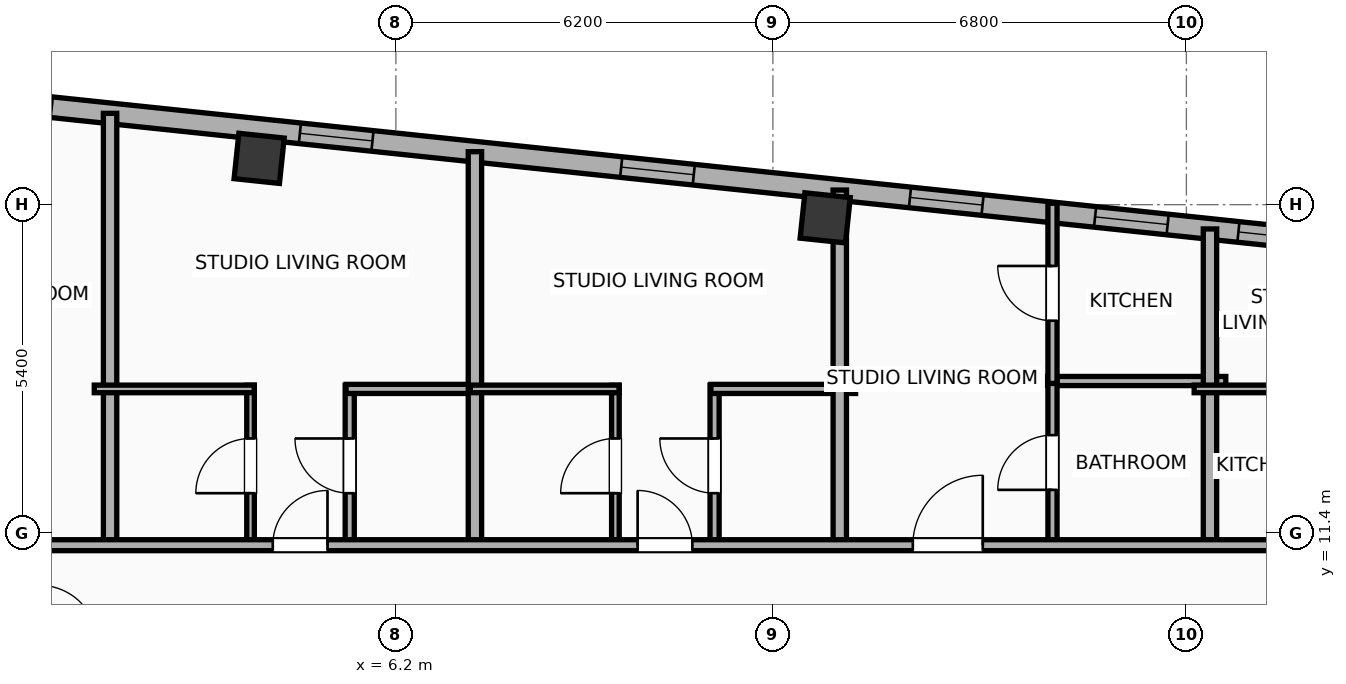
"""IFC4 building model, lengths in metres.
Left out: names, types, materials, properties, quantities, classifications, styles, units other than length and angle.
Written with IfcOpenShell. Run it as: python <this file> out.ifc"""

import sys

from ifc_helpers import new_model, si_unit, direction, frame, frame_2d, origin, origin_2d, place, context, subcontext, project, spatial, rectangle, hollow_rectangle, extrude, element, fill, save


model = new_model("IFC4")
c1 = context("Model", 3, precision=1e-05, world=origin(), true_north=direction((0.0, 1.0)))
c2 = subcontext(c1, "Body", "Model", "MODEL_VIEW")
j1 = project(units=[si_unit("LENGTHUNIT", "METRE"), si_unit("PLANEANGLEUNIT", "RADIAN")], contexts=[c1])
p1 = place(None, origin())
s1 = spatial("IfcSite", under=j1, at=p1, CompositionType="ELEMENT")
p2 = place(p1, origin())
s2 = spatial("IfcBuilding", under=s1, at=p2, CompositionType="ELEMENT")
p3 = place(p2, frame((0.0, 0.0, 287.3)))
s3 = spatial("IfcBuildingStorey", under=s2, at=p3, CompositionType="ELEMENT", Elevation=287.3)
for number, where, z_axis, x_axis in (
    (1, (13.26, 16.583, 0.0), (0.0, 0.0, 1.0), (0.995, -0.105, 0.0)),
    (2, (3.952, 17.561, 0.0), (0.0, 0.0, 1.0), (0.995, -0.105, 0.0)),
):
    element("IfcColumn", number, at=place(p3, frame(where, z_axis=z_axis, x_axis=x_axis)), inside=s3, PredefinedType="COLUMN", context=c2, shape_type="SweptSolid", body=[
        extrude(hollow_rectangle(XDim=0.75, YDim=0.75, WallThickness=0.025, at=origin_2d()), origin(), (0.0, 0.0, 1.0), 3.9),
    ])
p4 = place(p3, frame((-23.908, 20.972, 0.0), z_axis=(0.0, 0.0, 1.0), x_axis=(0.994521888554, -0.104528528102, 0.0)))
e3 = element("IfcWall", 3, at=p4, inside=s3, PredefinedType="ELEMENTEDWALL", context=c2, shape_type="SweptSolid", body=[
    extrude(rectangle(XDim=46.766, YDim=0.34, at=frame_2d((23.383, 0.0))), origin(), (0.0, 0.0, 1.0), 3.635),
])
p5 = place(p4, frame((22.183, 0.0, 0.75)))
e4 = element("IfcOpeningElement", 4, at=p5, cuts=e3, PredefinedType="OPENING", context=c2, shape_type="SweptSolid", body=[
    extrude(rectangle(XDim=2.4, YDim=2.1, at=frame_2d((1.2, 1.05))), frame((0.0, 0.18, 0.0), z_axis=(0.0, -1.0, 0.0), x_axis=(1.0, 0.0, 0.0)), (0.0, 0.0, 1.0), 0.36),
])
p6 = place(p4, frame((4.49, 0.0, 0.75)))
e5 = element("IfcOpeningElement", 5, at=p6, cuts=e3, PredefinedType="OPENING", context=c2, shape_type="SweptSolid", body=[
    extrude(rectangle(XDim=1.2, YDim=2.05, at=frame_2d((0.6, 1.025))), frame((0.0, 0.18, 0.0), z_axis=(0.0, -1.0, 0.0), x_axis=(1.0, 0.0, 0.0)), (0.0, 0.0, 1.0), 0.36),
])
p7 = place(p4, frame((1.657, 0.0, 0.75)))
e6 = element("IfcOpeningElement", 6, at=p7, cuts=e3, PredefinedType="OPENING", context=c2, shape_type="SweptSolid", body=[
    extrude(rectangle(XDim=1.2, YDim=2.05, at=frame_2d((0.6, 1.025))), frame((0.0, 0.18, 0.0), z_axis=(0.0, -1.0, 0.0), x_axis=(1.0, 0.0, 0.0)), (0.0, 0.0, 1.0), 0.36),
])
p8 = place(p4, frame((9.885, 0.0, 0.75)))
e7 = element("IfcOpeningElement", 7, at=p8, cuts=e3, PredefinedType="OPENING", context=c2, shape_type="SweptSolid", body=[
    extrude(rectangle(XDim=1.2, YDim=2.05, at=frame_2d((0.6, 1.025))), frame((0.0, 0.18, 0.0), z_axis=(0.0, -1.0, 0.0), x_axis=(1.0, 0.0, 0.0)), (0.0, 0.0, 1.0), 0.36),
])
p9 = place(p4, frame((16.427, 0.0, 0.75)))
e8 = element("IfcOpeningElement", 8, at=p9, cuts=e3, PredefinedType="OPENING", context=c2, shape_type="SweptSolid", body=[
    extrude(rectangle(XDim=1.2, YDim=2.05, at=frame_2d((0.6, 1.025))), frame((0.0, 0.18, 0.0), z_axis=(0.0, -1.0, 0.0), x_axis=(1.0, 0.0, 0.0)), (0.0, 0.0, 1.0), 0.36),
])
p10 = place(p4, frame((13.159, 0.0, 0.75)))
e9 = element("IfcOpeningElement", 9, at=p10, cuts=e3, PredefinedType="OPENING", context=c2, shape_type="SweptSolid", body=[
    extrude(rectangle(XDim=1.2, YDim=2.05, at=frame_2d((0.6, 1.025))), frame((0.0, 0.18, 0.0), z_axis=(0.0, -1.0, 0.0), x_axis=(1.0, 0.0, 0.0)), (0.0, 0.0, 1.0), 0.36),
])
p11 = place(p4, frame((19.586, 0.0, 0.75)))
e10 = element("IfcOpeningElement", 10, at=p11, cuts=e3, PredefinedType="OPENING", context=c2, shape_type="SweptSolid", body=[
    extrude(rectangle(XDim=1.2, YDim=2.05, at=frame_2d((0.6, 1.025))), frame((0.0, 0.18, 0.0), z_axis=(0.0, -1.0, 0.0), x_axis=(1.0, 0.0, 0.0)), (0.0, 0.0, 1.0), 0.36),
])
p12 = place(p4, frame((28.687, 0.0, 0.75)))
e11 = element("IfcOpeningElement", 11, at=p12, cuts=e3, PredefinedType="OPENING", context=c2, shape_type="SweptSolid", body=[
    extrude(rectangle(XDim=1.2, YDim=2.05, at=frame_2d((0.6, 1.025))), frame((0.0, 0.18, 0.0), z_axis=(0.0, -1.0, 0.0), x_axis=(1.0, 0.0, 0.0)), (0.0, 0.0, 1.0), 0.36),
])
p13 = place(p4, frame((34.0, 0.0, 0.75)))
e12 = element("IfcOpeningElement", 12, at=p13, cuts=e3, PredefinedType="OPENING", context=c2, shape_type="SweptSolid", body=[
    extrude(rectangle(XDim=1.2, YDim=2.05, at=frame_2d((0.6, 1.025))), frame((0.0, 0.18, 0.0), z_axis=(0.0, -1.0, 0.0), x_axis=(1.0, 0.0, 0.0)), (0.0, 0.0, 1.0), 0.36),
])
p14 = place(p4, frame((38.775, 0.0, 0.75)))
e13 = element("IfcOpeningElement", 13, at=p14, cuts=e3, PredefinedType="OPENING", context=c2, shape_type="SweptSolid", body=[
    extrude(rectangle(XDim=1.2, YDim=2.05, at=frame_2d((0.6, 1.025))), frame((0.0, 0.18, 0.0), z_axis=(0.0, -1.0, 0.0), x_axis=(1.0, 0.0, 0.0)), (0.0, 0.0, 1.0), 0.36),
])
p15 = place(p4, frame((41.836, 0.0, 0.75)))
e14 = element("IfcOpeningElement", 14, at=p15, cuts=e3, PredefinedType="OPENING", context=c2, shape_type="SweptSolid", body=[
    extrude(rectangle(XDim=1.2, YDim=2.05, at=frame_2d((0.6, 1.025))), frame((0.0, 0.18, 0.0), z_axis=(0.0, -1.0, 0.0), x_axis=(1.0, 0.0, 0.0)), (0.0, 0.0, 1.0), 0.36),
])
p16 = place(p4, frame((44.206, 0.0, 0.75)))
e15 = element("IfcOpeningElement", 15, at=p16, cuts=e3, PredefinedType="OPENING", context=c2, shape_type="SweptSolid", body=[
    extrude(rectangle(XDim=1.2, YDim=2.05, at=frame_2d((0.6, 1.025))), frame((0.0, 0.18, 0.0), z_axis=(0.0, -1.0, 0.0), x_axis=(1.0, 0.0, 0.0)), (0.0, 0.0, 1.0), 0.36),
])
p17 = place(p3, frame((1.5, 11.12, 0.0), z_axis=(0.0, 0.0, 1.0), x_axis=(0.0, 1.0, 0.0)))
e16 = element("IfcWall", 16, at=p17, inside=s3, PredefinedType="PARTITIONING", context=c2, shape_type="SweptSolid", body=[
    extrude(rectangle(XDim=7.182, YDim=0.22, at=frame_2d((3.591, 0.0))), origin(), (0.0, 0.0, 1.0), 3.635),
])
p18 = place(p3, frame((3.81, 11.18, 0.0), z_axis=(0.0, 0.0, 1.0), x_axis=(0.0, 1.0, 0.0)))
e17 = element("IfcWall", 17, at=p18, inside=s3, PredefinedType="PARTITIONING", context=c2, shape_type="SweptSolid", body=[
    extrude(rectangle(XDim=2.65, YDim=0.125, at=frame_2d((1.325, 0.0))), origin(), (0.0, 0.0, 1.0), 3.635),
])
p19 = place(p18, frame((0.875, 0.0, 0.0)))
e18 = element("IfcOpeningElement", 18, at=p19, cuts=e17, PredefinedType="OPENING", context=c2, shape_type="SweptSolid", body=[
    extrude(rectangle(XDim=0.9, YDim=2.05, at=frame_2d((0.45, 1.025))), frame((0.0, 0.073, 0.0), z_axis=(0.0, -1.0, 0.0), x_axis=(1.0, 0.0, 0.0)), (0.0, 0.0, 1.0), 0.145),
])
p20 = place(p3, frame((5.441, 11.18, 0.0), z_axis=(0.0, 0.0, 1.0), x_axis=(0.0, 1.0, 0.0)))
e19 = element("IfcWall", 19, at=p20, inside=s3, PredefinedType="PLUMBINGWALL", context=c2, shape_type="SweptSolid", body=[
    extrude(rectangle(XDim=2.65, YDim=0.15, at=frame_2d((1.325, 0.0))), origin(), (0.0, 0.0, 1.0), 3.635),
])
p21 = place(p20, frame((0.875, 0.0, 0.0)))
e20 = element("IfcOpeningElement", 20, at=p21, cuts=e19, PredefinedType="OPENING", context=c2, shape_type="SweptSolid", body=[
    extrude(rectangle(XDim=0.9, YDim=2.05, at=frame_2d((0.45, 1.025))), frame((0.0, 0.085, 0.0), z_axis=(0.0, -1.0, 0.0), x_axis=(1.0, 0.0, 0.0)), (0.0, 0.0, 1.0), 0.17),
])
p22 = place(p3, frame((1.24, 13.77, 0.0), z_axis=(0.0, 0.0, 1.0), x_axis=(1.0, 0.0, 0.0)))
e21 = element("IfcWall", 21, at=p22, inside=s3, PredefinedType="PARTITIONING", context=c2, shape_type="SweptSolid", body=[
    extrude(rectangle(XDim=2.63, YDim=0.125, at=frame_2d((1.315, 0.0))), origin(), (0.0, 0.0, 1.0), 3.635),
])
p23 = place(p3, frame((5.381, 13.77, 0.0), z_axis=(0.0, 0.0, 1.0), x_axis=(1.0, 0.0, 0.0)))
e22 = element("IfcWall", 22, at=p23, inside=s3, PredefinedType="PLUMBINGWALL", context=c2, shape_type="SweptSolid", body=[
    extrude(rectangle(XDim=2.194, YDim=0.15, at=frame_2d((1.097, 0.0))), origin(), (0.0, 0.0, 1.0), 3.635),
])
p24 = place(p3, frame((7.5, 11.12, 0.0), z_axis=(0.0, 0.0, 1.0), x_axis=(0.0, 1.0, 0.0)))
e23 = element("IfcWall", 23, at=p24, inside=s3, PredefinedType="PARTITIONING", context=c2, shape_type="SweptSolid", body=[
    extrude(rectangle(XDim=6.551, YDim=0.22, at=frame_2d((3.275, 0.0))), origin(), (0.0, 0.0, 1.0), 3.635),
])
p25 = place(p3, frame((9.81, 11.18, 0.0), z_axis=(0.0, 0.0, 1.0), x_axis=(0.0, 1.0, 0.0)))
e24 = element("IfcWall", 24, at=p25, inside=s3, PredefinedType="PARTITIONING", context=c2, shape_type="SweptSolid", body=[
    extrude(rectangle(XDim=2.65, YDim=0.125, at=frame_2d((1.325, 0.0))), origin(), (0.0, 0.0, 1.0), 3.635),
])
p26 = place(p25, frame((0.875, 0.0, 0.0)))
e25 = element("IfcOpeningElement", 25, at=p26, cuts=e24, PredefinedType="OPENING", context=c2, shape_type="SweptSolid", body=[
    extrude(rectangle(XDim=0.9, YDim=2.05, at=frame_2d((0.45, 1.025))), frame((0.0, 0.073, 0.0), z_axis=(0.0, -1.0, 0.0), x_axis=(1.0, 0.0, 0.0)), (0.0, 0.0, 1.0), 0.145),
])
p27 = place(p3, frame((11.441, 11.18, 0.0), z_axis=(0.0, 0.0, 1.0), x_axis=(0.0, 1.0, 0.0)))
e26 = element("IfcWall", 26, at=p27, inside=s3, PredefinedType="PLUMBINGWALL", context=c2, shape_type="SweptSolid", body=[
    extrude(rectangle(XDim=2.65, YDim=0.15, at=frame_2d((1.325, 0.0))), origin(), (0.0, 0.0, 1.0), 3.635),
])
p28 = place(p27, frame((0.875, 0.0, 0.0)))
e27 = element("IfcOpeningElement", 27, at=p28, cuts=e26, PredefinedType="OPENING", context=c2, shape_type="SweptSolid", body=[
    extrude(rectangle(XDim=0.9, YDim=2.05, at=frame_2d((0.45, 1.025))), frame((0.0, 0.085, 0.0), z_axis=(0.0, -1.0, 0.0), x_axis=(1.0, 0.0, 0.0)), (0.0, 0.0, 1.0), 0.17),
])
p29 = place(p3, frame((7.425, 13.77, 0.0), z_axis=(0.0, 0.0, 1.0), x_axis=(1.0, 0.0, 0.0)))
e28 = element("IfcWall", 28, at=p29, inside=s3, PredefinedType="PARTITIONING", context=c2, shape_type="SweptSolid", body=[
    extrude(rectangle(XDim=2.445, YDim=0.125, at=frame_2d((1.223, 0.0))), origin(), (0.0, 0.0, 1.0), 3.635),
])
p30 = place(p3, frame((11.381, 13.77, 0.0), z_axis=(0.0, 0.0, 1.0), x_axis=(1.0, 0.0, 0.0)))
e29 = element("IfcWall", 29, at=p30, inside=s3, PredefinedType="PLUMBINGWALL", context=c2, shape_type="SweptSolid", body=[
    extrude(rectangle(XDim=2.379, YDim=0.15, at=frame_2d((1.189, 0.0))), origin(), (0.0, 0.0, 1.0), 3.635),
])
p31 = place(p3, frame((13.5, 11.12, 0.0), z_axis=(0.0, 0.0, 1.0), x_axis=(0.0, 1.0, 0.0)))
e30 = element("IfcWall", 30, at=p31, inside=s3, PredefinedType="PARTITIONING", context=c2, shape_type="SweptSolid", body=[
    extrude(rectangle(XDim=5.92, YDim=0.22, at=frame_2d((2.96, 0.0))), origin(), (0.0, 0.0, 1.0), 3.635),
])
p32 = place(p3, frame((16.918, 13.9, 0.0), z_axis=(0.0, 0.0, 1.0), x_axis=(1.0, 0.0, 0.0)))
e31 = element("IfcWall", 31, at=p32, inside=s3, PredefinedType="PLUMBINGWALL", context=c2, shape_type="SweptSolid", body=[
    extrude(rectangle(XDim=2.93, YDim=0.15, at=frame_2d((1.465, 0.0))), origin(), (0.0, 0.0, 1.0), 3.635),
])
p33 = place(p3, frame((16.998, 11.18, 0.0), z_axis=(0.0, 0.0, 1.0), x_axis=(0.0, 1.0, 0.0)))
e32 = element("IfcWall", 32, at=p33, inside=s3, PredefinedType="PLUMBINGWALL", context=c2, shape_type="SweptSolid", body=[
    extrude(rectangle(XDim=2.76, YDim=0.15, at=frame_2d((1.38, 0.0))), origin(), (0.0, 0.0, 1.0), 3.635),
])
p34 = place(p33, frame((0.93, 0.0, 0.0)))
e33 = element("IfcOpeningElement", 33, at=p34, cuts=e32, PredefinedType="OPENING", context=c2, shape_type="SweptSolid", body=[
    extrude(rectangle(XDim=0.9, YDim=2.05, at=frame_2d((0.45, 1.025))), frame((0.0, 0.085, 0.0), z_axis=(0.0, -1.0, 0.0), x_axis=(1.0, 0.0, 0.0)), (0.0, 0.0, 1.0), 0.17),
])
p35 = place(p3, frame((16.998, 13.86, 0.0), z_axis=(0.0, 0.0, 1.0), x_axis=(0.0, 1.0, 0.0)))
e34 = element("IfcWall", 34, at=p35, inside=s3, PredefinedType="PLUMBINGWALL", context=c2, shape_type="SweptSolid", body=[
    extrude(rectangle(XDim=2.963, YDim=0.15, at=frame_2d((1.482, 0.0))), origin(), (0.0, 0.0, 1.0), 3.635),
])
p36 = place(p35, frame((1.032, 0.0, 0.0)))
e35 = element("IfcOpeningElement", 35, at=p36, cuts=e34, PredefinedType="OPENING", context=c2, shape_type="SweptSolid", body=[
    extrude(rectangle(XDim=0.9, YDim=2.05, at=frame_2d((0.45, 1.025))), frame((0.0, 0.085, 0.0), z_axis=(0.0, -1.0, 0.0), x_axis=(1.0, 0.0, 0.0)), (0.0, 0.0, 1.0), 0.17),
])
p37 = place(p3, frame((19.588, 11.12, 0.0), z_axis=(0.0, 0.0, 1.0), x_axis=(0.0, 1.0, 0.0)))
e36 = element("IfcWall", 36, at=p37, inside=s3, PredefinedType="PARTITIONING", context=c2, shape_type="SweptSolid", body=[
    extrude(rectangle(XDim=5.281, YDim=0.22, at=frame_2d((2.64, 0.0))), origin(), (0.0, 0.0, 1.0), 3.635),
])
p38 = place(p3, frame((19.328, 13.77, 0.0), z_axis=(0.0, 0.0, 1.0), x_axis=(1.0, 0.0, 0.0)))
e37 = element("IfcWall", 37, at=p38, inside=s3, PredefinedType="PARTITIONING", context=c2, shape_type="SweptSolid", body=[
    extrude(rectangle(XDim=2.671, YDim=0.125, at=frame_2d((1.335, 0.0))), origin(), (0.0, 0.0, 1.0), 3.635),
])
p39 = place(p3, frame((-28.401, 11.2, 0.0), z_axis=(0.0, 0.0, 1.0), x_axis=(1.0, 0.0, 0.0)))
e38 = element("IfcWall", 38, at=p39, inside=s3, PredefinedType="PARTITIONING", context=c2, shape_type="SweptSolid", body=[
    extrude(rectangle(XDim=53.956, YDim=0.18, at=frame_2d((26.978, 0.0))), origin(), (0.0, 0.0, 1.0), 3.635),
])
p40 = place(p39, frame((2.512, 0.0, 0.0)))
e39 = element("IfcOpeningElement", 39, at=p40, cuts=e38, PredefinedType="OPENING", context=c2, shape_type="SweptSolid", body=[
    extrude(rectangle(XDim=0.9, YDim=2.05, at=frame_2d((0.45, 1.025))), frame((0.0, 0.1, 0.0), z_axis=(0.0, -1.0, 0.0), x_axis=(1.0, 0.0, 0.0)), (0.0, 0.0, 1.0), 0.2),
])
p41 = place(p39, frame((8.948, 0.0, 0.0)))
e40 = element("IfcOpeningElement", 40, at=p41, cuts=e38, PredefinedType="OPENING", context=c2, shape_type="SweptSolid", body=[
    extrude(rectangle(XDim=1.15, YDim=2.05, at=frame_2d((0.575, 1.025))), frame((0.0, 0.1, 0.0), z_axis=(0.0, -1.0, 0.0), x_axis=(1.0, 0.0, 0.0)), (0.0, 0.0, 1.0), 0.2),
])
p42 = place(p39, frame((13.821, 0.0, 0.0)))
e41 = element("IfcOpeningElement", 41, at=p42, cuts=e38, PredefinedType="OPENING", context=c2, shape_type="SweptSolid", body=[
    extrude(rectangle(XDim=0.9, YDim=2.05, at=frame_2d((0.45, 1.025))), frame((0.0, 0.1, 0.0), z_axis=(0.0, -1.0, 0.0), x_axis=(1.0, 0.0, 0.0)), (0.0, 0.0, 1.0), 0.2),
])
p43 = place(p39, frame((20.818, 0.0, 0.0)))
e42 = element("IfcOpeningElement", 42, at=p43, cuts=e38, PredefinedType="OPENING", context=c2, shape_type="SweptSolid", body=[
    extrude(rectangle(XDim=1.15, YDim=2.05, at=frame_2d((0.575, 1.025))), frame((0.0, 0.1, 0.0), z_axis=(0.0, -1.0, 0.0), x_axis=(1.0, 0.0, 0.0)), (0.0, 0.0, 1.0), 0.2),
])
p44 = place(p39, frame((27.212, 0.0, 0.0)))
e43 = element("IfcOpeningElement", 43, at=p44, cuts=e38, PredefinedType="OPENING", context=c2, shape_type="SweptSolid", body=[
    extrude(rectangle(XDim=1.15, YDim=2.05, at=frame_2d((0.575, 1.025))), frame((0.0, 0.1, 0.0), z_axis=(0.0, -1.0, 0.0), x_axis=(1.0, 0.0, 0.0)), (0.0, 0.0, 1.0), 0.2),
])
p45 = place(p39, frame((32.576, 0.0, 0.0)))
e44 = element("IfcOpeningElement", 44, at=p45, cuts=e38, PredefinedType="OPENING", context=c2, shape_type="SweptSolid", body=[
    extrude(rectangle(XDim=0.9, YDim=2.05, at=frame_2d((0.45, 1.025))), frame((0.0, 0.1, 0.0), z_axis=(0.0, -1.0, 0.0), x_axis=(1.0, 0.0, 0.0)), (0.0, 0.0, 1.0), 0.2),
])
p46 = place(p39, frame((38.576, 0.0, 0.0)))
e45 = element("IfcOpeningElement", 45, at=p46, cuts=e38, PredefinedType="OPENING", context=c2, shape_type="SweptSolid", body=[
    extrude(rectangle(XDim=0.9, YDim=2.05, at=frame_2d((0.45, 1.025))), frame((0.0, 0.1, 0.0), z_axis=(0.0, -1.0, 0.0), x_axis=(1.0, 0.0, 0.0)), (0.0, 0.0, 1.0), 0.2),
])
p47 = place(p39, frame((43.102, 0.0, 0.0)))
e46 = element("IfcOpeningElement", 46, at=p47, cuts=e38, PredefinedType="OPENING", context=c2, shape_type="SweptSolid", body=[
    extrude(rectangle(XDim=1.15, YDim=2.05, at=frame_2d((0.575, 1.025))), frame((0.0, 0.1, 0.0), z_axis=(0.0, -1.0, 0.0), x_axis=(1.0, 0.0, 0.0)), (0.0, 0.0, 1.0), 0.2),
])
p48 = place(p39, frame((50.732, 0.0, 0.0)))
e47 = element("IfcOpeningElement", 47, at=p48, cuts=e38, PredefinedType="OPENING", context=c2, shape_type="SweptSolid", body=[
    extrude(rectangle(XDim=0.9, YDim=2.05, at=frame_2d((0.45, 1.025))), frame((0.0, 0.1, 0.0), z_axis=(0.0, -1.0, 0.0), x_axis=(1.0, 0.0, 0.0)), (0.0, 0.0, 1.0), 0.2),
])
p49 = place(p12, origin())
e48 = element("IfcWindow", 48, at=p49, inside=s3, PartitioningType="SINGLE_PANEL", PredefinedType="WINDOW", context=c2, shape_type="SweptSolid", body=[
    extrude(rectangle(XDim=1.2, YDim=2.05, at=frame_2d((0.6, 1.025))), frame((0.0, 0.03, 0.0), z_axis=(0.0, -1.0, 0.0), x_axis=(1.0, 0.0, 0.0)), (0.0, 0.0, 1.0), 0.06),
])
fill(e11, e48)
p50 = place(p13, origin())
e49 = element("IfcWindow", 49, at=p50, inside=s3, PartitioningType="SINGLE_PANEL", PredefinedType="WINDOW", context=c2, shape_type="SweptSolid", body=[
    extrude(rectangle(XDim=1.2, YDim=2.05, at=frame_2d((0.6, 1.025))), frame((0.0, 0.03, 0.0), z_axis=(0.0, -1.0, 0.0), x_axis=(1.0, 0.0, 0.0)), (0.0, 0.0, 1.0), 0.06),
])
fill(e12, e49)
p51 = place(p14, origin())
e50 = element("IfcWindow", 50, at=p51, inside=s3, PartitioningType="SINGLE_PANEL", PredefinedType="WINDOW", context=c2, shape_type="SweptSolid", body=[
    extrude(rectangle(XDim=1.2, YDim=2.05, at=frame_2d((0.6, 1.025))), frame((0.0, 0.03, 0.0), z_axis=(0.0, -1.0, 0.0), x_axis=(1.0, 0.0, 0.0)), (0.0, 0.0, 1.0), 0.06),
])
fill(e13, e50)
p52 = place(p15, origin())
e51 = element("IfcWindow", 51, at=p52, inside=s3, PartitioningType="SINGLE_PANEL", PredefinedType="WINDOW", context=c2, shape_type="SweptSolid", body=[
    extrude(rectangle(XDim=1.2, YDim=2.05, at=frame_2d((0.6, 1.025))), frame((0.0, 0.03, 0.0), z_axis=(0.0, -1.0, 0.0), x_axis=(1.0, 0.0, 0.0)), (0.0, 0.0, 1.0), 0.06),
])
fill(e14, e51)
p53 = place(p16, origin())
e52 = element("IfcWindow", 52, at=p53, inside=s3, PartitioningType="SINGLE_PANEL", PredefinedType="WINDOW", context=c2, shape_type="SweptSolid", body=[
    extrude(rectangle(XDim=1.2, YDim=2.05, at=frame_2d((0.6, 1.025))), frame((0.0, 0.03, 0.0), z_axis=(0.0, -1.0, 0.0), x_axis=(1.0, 0.0, 0.0)), (0.0, 0.0, 1.0), 0.06),
])
fill(e15, e52)
p54 = place(p19, origin())
e53 = element("IfcDoor", 53, at=p54, inside=s3, OperationType="SINGLE_SWING_LEFT", PredefinedType="DOOR", context=c2, shape_type="SweptSolid", body=[
    extrude(rectangle(XDim=0.9, YDim=2.05, at=frame_2d((0.45, 1.025))), frame((0.0, 0.025, 0.0), z_axis=(0.0, -1.0, 0.0), x_axis=(1.0, 0.0, 0.0)), (0.0, 0.0, 1.0), 0.05),
])
fill(e18, e53)
p55 = place(p21, origin())
e54 = element("IfcDoor", 54, at=p55, inside=s3, OperationType="SINGLE_SWING_RIGHT", PredefinedType="DOOR", context=c2, shape_type="SweptSolid", body=[
    extrude(rectangle(XDim=0.9, YDim=2.05, at=frame_2d((0.45, 1.025))), frame((0.0, 0.025, 0.0), z_axis=(0.0, -1.0, 0.0), x_axis=(1.0, 0.0, 0.0)), (0.0, 0.0, 1.0), 0.05),
])
fill(e20, e54)
p56 = place(p26, origin())
e55 = element("IfcDoor", 55, at=p56, inside=s3, OperationType="SINGLE_SWING_LEFT", PredefinedType="DOOR", context=c2, shape_type="SweptSolid", body=[
    extrude(rectangle(XDim=0.9, YDim=2.05, at=frame_2d((0.45, 1.025))), frame((0.0, 0.025, 0.0), z_axis=(0.0, -1.0, 0.0), x_axis=(1.0, 0.0, 0.0)), (0.0, 0.0, 1.0), 0.05),
])
fill(e25, e55)
p57 = place(p28, origin())
e56 = element("IfcDoor", 56, at=p57, inside=s3, OperationType="SINGLE_SWING_RIGHT", PredefinedType="DOOR", context=c2, shape_type="SweptSolid", body=[
    extrude(rectangle(XDim=0.9, YDim=2.05, at=frame_2d((0.45, 1.025))), frame((0.0, 0.025, 0.0), z_axis=(0.0, -1.0, 0.0), x_axis=(1.0, 0.0, 0.0)), (0.0, 0.0, 1.0), 0.05),
])
fill(e27, e56)
p58 = place(p34, origin())
e57 = element("IfcDoor", 57, at=p58, inside=s3, OperationType="SINGLE_SWING_LEFT", PredefinedType="DOOR", context=c2, shape_type="SweptSolid", body=[
    extrude(rectangle(XDim=0.9, YDim=2.05, at=frame_2d((0.45, 1.025))), frame((0.0, 0.025, 0.0), z_axis=(0.0, -1.0, 0.0), x_axis=(1.0, 0.0, 0.0)), (0.0, 0.0, 1.0), 0.05),
])
fill(e33, e57)
p59 = place(p36, origin())
e58 = element("IfcDoor", 58, at=p59, inside=s3, OperationType="SINGLE_SWING_RIGHT", PredefinedType="DOOR", context=c2, shape_type="SweptSolid", body=[
    extrude(rectangle(XDim=0.9, YDim=2.05, at=frame_2d((0.45, 1.025))), frame((0.0, 0.025, 0.0), z_axis=(0.0, -1.0, 0.0), x_axis=(1.0, 0.0, 0.0)), (0.0, 0.0, 1.0), 0.05),
])
fill(e35, e58)
p60 = place(p45, origin())
e59 = element("IfcDoor", 59, at=p60, inside=s3, OperationType="SINGLE_SWING_RIGHT", PredefinedType="DOOR", context=c2, shape_type="SweptSolid", body=[
    extrude(rectangle(XDim=0.9, YDim=2.05, at=frame_2d((0.45, 1.025))), frame((0.0, 0.025, 0.0), z_axis=(0.0, -1.0, 0.0), x_axis=(1.0, 0.0, 0.0)), (0.0, 0.0, 1.0), 0.05),
])
fill(e44, e59)
p61 = place(p46, origin())
e60 = element("IfcDoor", 60, at=p61, inside=s3, OperationType="SINGLE_SWING_LEFT", PredefinedType="DOOR", context=c2, shape_type="SweptSolid", body=[
    extrude(rectangle(XDim=0.9, YDim=2.05, at=frame_2d((0.45, 1.025))), frame((0.0, 0.025, 0.0), z_axis=(0.0, -1.0, 0.0), x_axis=(1.0, 0.0, 0.0)), (0.0, 0.0, 1.0), 0.05),
])
fill(e45, e60)
p62 = place(p47, origin())
e61 = element("IfcDoor", 61, at=p62, inside=s3, OperationType="SINGLE_SWING_RIGHT", PredefinedType="DOOR", context=c2, shape_type="SweptSolid", body=[
    extrude(rectangle(XDim=1.15, YDim=2.05, at=frame_2d((0.575, 1.025))), frame((0.0, 0.025, 0.0), z_axis=(0.0, -1.0, 0.0), x_axis=(1.0, 0.0, 0.0)), (0.0, 0.0, 1.0), 0.05),
])
fill(e46, e61)
save(model, sys.argv[1])
